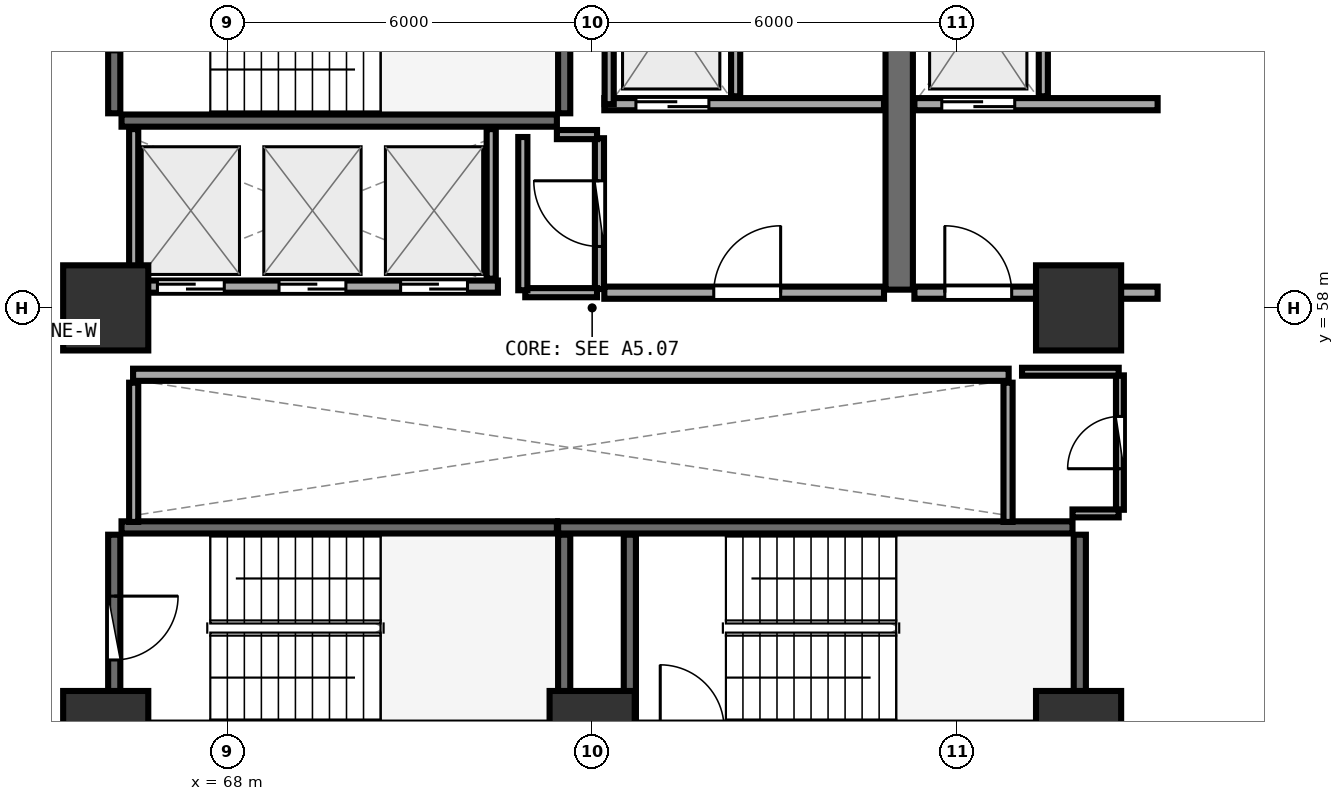
"""IFC4 building model, lengths in metres.
Left out: names, types, materials, properties, quantities, classifications, styles, units other than length and angle.
Written with IfcOpenShell. Run it as: python <this file> out.ifc"""

import sys

from ifc_helpers import new_model, si_unit, direction, frame, frame_2d, origin, origin_2d, place, context, subcontext, project, spatial, rectangle, extrude, element, fill, save


model = new_model("IFC4")
c1 = context("Model", 3, precision=1e-05, world=origin(), true_north=direction((0.0, 1.0)))
c2 = subcontext(c1, "Body", "Model", "MODEL_VIEW")
j1 = project(units=[si_unit("LENGTHUNIT", "METRE"), si_unit("PLANEANGLEUNIT", "RADIAN")], contexts=[c1])
p1 = place(None, origin())
s1 = spatial("IfcSite", under=j1, at=p1, CompositionType="ELEMENT")
p2 = place(p1, origin())
s2 = spatial("IfcBuilding", under=s1, at=p2, CompositionType="ELEMENT")
p3 = place(p2, frame((0.0, 0.0, 63.75)))
s3 = spatial("IfcBuildingStorey", under=s2, at=p3, CompositionType="ELEMENT", Elevation=63.75)
for number, where, z_axis, x_axis in (
    (1, (66.0, 51.0, 0.0), (0.0, 0.0, 1.0), (1.0, 0.0, 0.0)),
    (2, (74.0, 51.0, 0.0), (0.0, 0.0, 1.0), (1.0, 0.0, 0.0)),
    (3, (82.0, 51.0, 0.0), (0.0, 0.0, 1.0), (1.0, 0.0, 0.0)),
    (4, (82.0, 58.0, 0.0), (0.0, 0.0, 1.0), (1.0, 0.0, 0.0)),
    (5, (66.0, 58.0, 0.0), (0.0, 0.0, 1.0), (1.0, 0.0, 0.0)),
):
    element("IfcColumn", number, at=place(p3, frame(where, z_axis=z_axis, x_axis=x_axis)), inside=s3, PredefinedType="PILASTER", context=c2, shape_type="SweptSolid", body=[
        extrude(rectangle(XDim=1.4, YDim=1.4, at=origin_2d()), origin(), (0.0, 0.0, 1.0), 3.75),
    ])
p4 = place(p3, frame((66.26, 61.08, 0.0), z_axis=(0.0, 0.0, 1.0), x_axis=(1.0, 0.0, 0.0)))
e6 = element("IfcWall", 6, at=p4, inside=s3, PredefinedType="SHEAR", context=c2, shape_type="SweptSolid", body=[
    extrude(rectangle(XDim=7.16, YDim=0.2, at=frame_2d((3.58, 0.0))), origin(), (0.0, 0.0, 1.0), 3.49),
])
p5 = place(p3, frame((73.54, 61.2, 0.0), z_axis=(0.0, 0.0, 1.0), x_axis=(0.0, 1.0, 0.0)))
e7 = element("IfcWall", 7, at=p5, inside=s3, PredefinedType="SHEAR", context=c2, shape_type="SweptSolid", body=[
    extrude(rectangle(XDim=3.07, YDim=0.2, at=frame_2d((1.535, 0.0))), origin(), (0.0, 0.0, 1.0), 3.49),
])
p6 = place(p3, frame((66.14, 64.27, 0.0), z_axis=(0.0, 0.0, 1.0), x_axis=(0.0, -1.0, 0.0)))
e8 = element("IfcWall", 8, at=p6, inside=s3, PredefinedType="SHEAR", context=c2, shape_type="SweptSolid", body=[
    extrude(rectangle(XDim=3.07, YDim=0.2, at=frame_2d((1.535, 0.0))), origin(), (0.0, 0.0, 1.0), 3.49),
])
p7 = place(p6, frame((1.01, 0.0, 0.0)))
e9 = element("IfcOpeningElement", 9, at=p7, cuts=e8, PredefinedType="OPENING", context=c2, shape_type="SweptSolid", body=[
    extrude(rectangle(XDim=1.05, YDim=2.1, at=frame_2d((0.525, 1.05))), frame((0.0, 0.11, 0.0), z_axis=(0.0, -1.0, 0.0), x_axis=(1.0, 0.0, 0.0)), (0.0, 0.0, 1.0), 0.22),
])
p8 = place(p3, frame((82.02, 51.2, 0.0), z_axis=(0.0, 0.0, 1.0), x_axis=(0.0, 1.0, 0.0)))
e10 = element("IfcWall", 10, at=p8, inside=s3, PredefinedType="SHEAR", context=c2, shape_type="SweptSolid", body=[
    extrude(rectangle(XDim=3.07, YDim=0.2, at=frame_2d((1.535, 0.0))), origin(), (0.0, 0.0, 1.0), 3.49),
])
p9 = place(p3, frame((81.9, 54.39, 0.0), z_axis=(0.0, 0.0, 1.0), x_axis=(-1.0, 0.0, 0.0)))
e11 = element("IfcWall", 11, at=p9, inside=s3, PredefinedType="SHEAR", context=c2, shape_type="SweptSolid", body=[
    extrude(rectangle(XDim=8.46, YDim=0.2, at=frame_2d((4.23, 0.0))), origin(), (0.0, 0.0, 1.0), 3.49),
])
for number, where, z_axis, x_axis in (
    (12, (74.62, 54.27, 0.0), (0.0, 0.0, 1.0), (0.0, -1.0, 0.0)),
    (13, (73.54, 51.2, 0.0), (0.0, 0.0, 1.0), (0.0, 1.0, 0.0)),
):
    element("IfcWall", number, at=place(p3, frame(where, z_axis=z_axis, x_axis=x_axis)), inside=s3, PredefinedType="SHEAR", context=c2, shape_type="SweptSolid", body=[
        extrude(rectangle(XDim=3.07, YDim=0.2, at=frame_2d((1.535, 0.0))), origin(), (0.0, 0.0, 1.0), 3.49),
    ])
p10 = place(p3, frame((73.42, 54.39, 0.0), z_axis=(0.0, 0.0, 1.0), x_axis=(-1.0, 0.0, 0.0)))
e14 = element("IfcWall", 14, at=p10, inside=s3, PredefinedType="SHEAR", context=c2, shape_type="SweptSolid", body=[
    extrude(rectangle(XDim=7.16, YDim=0.2, at=frame_2d((3.58, 0.0))), origin(), (0.0, 0.0, 1.0), 3.49),
])
p11 = place(p3, frame((66.14, 54.27, 0.0), z_axis=(0.0, 0.0, 1.0), x_axis=(0.0, -1.0, 0.0)))
e15 = element("IfcWall", 15, at=p11, inside=s3, PredefinedType="SHEAR", context=c2, shape_type="SweptSolid", body=[
    extrude(rectangle(XDim=3.07, YDim=0.2, at=frame_2d((1.535, 0.0))), origin(), (0.0, 0.0, 1.0), 3.49),
])
p12 = place(p11, frame((1.01, 0.0, 0.0)))
e16 = element("IfcOpeningElement", 16, at=p12, cuts=e15, PredefinedType="OPENING", context=c2, shape_type="SweptSolid", body=[
    extrude(rectangle(XDim=1.05, YDim=2.1, at=frame_2d((0.525, 1.05))), frame((0.0, 0.11, 0.0), z_axis=(0.0, -1.0, 0.0), x_axis=(1.0, 0.0, 0.0)), (0.0, 0.0, 1.0), 0.22),
])
p13 = place(p3, frame((79.05, 58.3, 0.0), z_axis=(0.0, 0.0, 1.0), x_axis=(0.0, 1.0, 0.0)))
e17 = element("IfcWall", 17, at=p13, inside=s3, PredefinedType="SHEAR", context=c2, shape_type="SweptSolid", body=[
    extrude(rectangle(XDim=6.3, YDim=0.45, at=frame_2d((3.15, 0.0))), origin(), (0.0, 0.0, 1.0), 3.49),
])
p14 = place(p3, frame((74.2, 61.35, 0.0), z_axis=(0.0, 0.0, 1.0), x_axis=(1.0, 0.0, 0.0)))
e18 = element("IfcWall", 18, at=p14, inside=s3, PredefinedType="SOLIDWALL", context=c2, shape_type="SweptSolid", body=[
    extrude(rectangle(XDim=4.6, YDim=0.2, at=frame_2d((2.3, 0.0))), origin(), (0.0, 0.0, 1.0), 3.48),
])
p15 = place(p14, frame((0.52, 0.0, 0.0)))
e19 = element("IfcOpeningElement", 19, at=p15, cuts=e18, PredefinedType="OPENING", context=c2, shape_type="SweptSolid", body=[
    extrude(rectangle(XDim=1.2, YDim=2.15, at=frame_2d((0.6, 1.075))), frame((0.0, 0.11, 0.0), z_axis=(0.0, -1.0, 0.0), x_axis=(1.0, 0.0, 0.0)), (0.0, 0.0, 1.0), 0.22),
])
p16 = place(p3, frame((74.28, 61.35, 0.0), z_axis=(0.0, 0.0, 1.0), x_axis=(0.0, 1.0, 0.0)))
e20 = element("IfcWall", 20, at=p16, inside=s3, PredefinedType="PARTITIONING", context=c2, shape_type="SweptSolid", body=[
    extrude(rectangle(XDim=2.97, YDim=0.15, at=frame_2d((1.485, 0.0))), origin(), (0.0, 0.0, 1.0), 3.48),
])
p17 = place(p3, frame((76.36, 61.48, 0.0), z_axis=(0.0, 0.0, 1.0), x_axis=(0.0, 1.0, 0.0)))
e21 = element("IfcWall", 21, at=p17, inside=s3, PredefinedType="PARTITIONING", context=c2, shape_type="SweptSolid", body=[
    extrude(rectangle(XDim=2.84, YDim=0.15, at=frame_2d((1.42, 0.0))), origin(), (0.0, 0.0, 1.0), 3.48),
])
p18 = place(p3, frame((79.3, 61.35, 0.0), z_axis=(0.0, 0.0, 1.0), x_axis=(1.0, 0.0, 0.0)))
e22 = element("IfcWall", 22, at=p18, inside=s3, PredefinedType="SOLIDWALL", context=c2, shape_type="SweptSolid", body=[
    extrude(rectangle(XDim=4.0, YDim=0.2, at=frame_2d((2.0, 0.0))), origin(), (0.0, 0.0, 1.0), 2.775),
])
p19 = place(p18, frame((0.45, 0.0, 0.0)))
e23 = element("IfcOpeningElement", 23, at=p19, cuts=e22, PredefinedType="OPENING", context=c2, shape_type="SweptSolid", body=[
    extrude(rectangle(XDim=1.2, YDim=2.15, at=frame_2d((0.6, 1.075))), frame((0.0, 0.11, 0.0), z_axis=(0.0, -1.0, 0.0), x_axis=(1.0, 0.0, 0.0)), (0.0, 0.0, 1.0), 0.22),
])
p20 = place(p3, frame((81.42, 61.48, 0.0), z_axis=(0.0, 0.0, 1.0), x_axis=(0.0, 1.0, 0.0)))
e24 = element("IfcWall", 24, at=p20, inside=s3, PredefinedType="PARTITIONING", context=c2, shape_type="SweptSolid", body=[
    extrude(rectangle(XDim=2.84, YDim=0.15, at=frame_2d((1.42, 0.0))), origin(), (0.0, 0.0, 1.0), 3.48),
])
p21 = place(p3, frame((74.2, 58.25, 0.0), z_axis=(0.0, 0.0, 1.0), x_axis=(1.0, 0.0, 0.0)))
e25 = element("IfcWall", 25, at=p21, inside=s3, PredefinedType="SOLIDWALL", context=c2, shape_type="SweptSolid", body=[
    extrude(rectangle(XDim=4.6, YDim=0.2, at=frame_2d((2.3, 0.0))), origin(), (0.0, 0.0, 1.0), 3.48),
])
p22 = place(p21, frame((1.8, 0.0, 0.0)))
e26 = element("IfcOpeningElement", 26, at=p22, cuts=e25, PredefinedType="OPENING", context=c2, shape_type="SweptSolid", body=[
    extrude(rectangle(XDim=1.1, YDim=2.1, at=frame_2d((0.55, 1.05))), frame((0.0, 0.11, 0.0), z_axis=(0.0, -1.0, 0.0), x_axis=(1.0, 0.0, 0.0)), (0.0, 0.0, 1.0), 0.22),
])
p23 = place(p3, frame((79.3, 58.25, 0.0), z_axis=(0.0, 0.0, 1.0), x_axis=(1.0, 0.0, 0.0)))
e27 = element("IfcWall", 27, at=p23, inside=s3, PredefinedType="SOLIDWALL", context=c2, shape_type="SweptSolid", body=[
    extrude(rectangle(XDim=4.0, YDim=0.2, at=frame_2d((2.0, 0.0))), origin(), (0.0, 0.0, 1.0), 2.775),
])
p24 = place(p23, frame((0.5, 0.0, 0.0)))
e28 = element("IfcOpeningElement", 28, at=p24, cuts=e27, PredefinedType="OPENING", context=c2, shape_type="SweptSolid", body=[
    extrude(rectangle(XDim=1.1, YDim=2.1, at=frame_2d((0.55, 1.05))), frame((0.0, 0.11, 0.0), z_axis=(0.0, -1.0, 0.0), x_axis=(1.0, 0.0, 0.0)), (0.0, 0.0, 1.0), 0.22),
])
p25 = place(p3, frame((66.45, 58.35, 0.0), z_axis=(0.0, 0.0, 1.0), x_axis=(1.0, 0.0, 0.0)))
e29 = element("IfcWall", 29, at=p25, inside=s3, PredefinedType="SOLIDWALL", context=c2, shape_type="SweptSolid", body=[
    extrude(rectangle(XDim=6.0, YDim=0.2, at=frame_2d((3.0, 0.0))), origin(), (0.0, 0.0, 1.0), 3.48),
])
p26 = place(p25, frame((0.4, 0.0, 0.0)))
e30 = element("IfcOpeningElement", 30, at=p26, cuts=e29, PredefinedType="OPENING", context=c2, shape_type="SweptSolid", body=[
    extrude(rectangle(XDim=1.1, YDim=2.1, at=frame_2d((0.55, 1.05))), frame((0.0, 0.11, 0.0), z_axis=(0.0, -1.0, 0.0), x_axis=(1.0, 0.0, 0.0)), (0.0, 0.0, 1.0), 0.22),
])
p27 = place(p25, frame((2.4, 0.0, 0.0)))
e31 = element("IfcOpeningElement", 31, at=p27, cuts=e29, PredefinedType="OPENING", context=c2, shape_type="SweptSolid", body=[
    extrude(rectangle(XDim=1.1, YDim=2.1, at=frame_2d((0.55, 1.05))), frame((0.0, 0.11, 0.0), z_axis=(0.0, -1.0, 0.0), x_axis=(1.0, 0.0, 0.0)), (0.0, 0.0, 1.0), 0.22),
])
p28 = place(p25, frame((4.4, 0.0, 0.0)))
e32 = element("IfcOpeningElement", 32, at=p28, cuts=e29, PredefinedType="OPENING", context=c2, shape_type="SweptSolid", body=[
    extrude(rectangle(XDim=1.1, YDim=2.1, at=frame_2d((0.55, 1.05))), frame((0.0, 0.11, 0.0), z_axis=(0.0, -1.0, 0.0), x_axis=(1.0, 0.0, 0.0)), (0.0, 0.0, 1.0), 0.22),
])
for number, where, z_axis, x_axis in (
    (33, (66.46, 58.48, 0.0), (0.0, 0.0, 1.0), (0.0, 1.0, 0.0)),
    (34, (72.34, 58.48, 0.0), (0.0, 0.0, 1.0), (0.0, 1.0, 0.0)),
):
    element("IfcWall", number, at=place(p3, frame(where, z_axis=z_axis, x_axis=x_axis)), inside=s3, PredefinedType="PARTITIONING", context=c2, shape_type="SweptSolid", body=[
        extrude(rectangle(XDim=2.46, YDim=0.15, at=frame_2d((1.23, 0.0))), origin(), (0.0, 0.0, 1.0), 3.48),
    ])
p29 = place(p3, frame((66.45, 56.9, 0.0), z_axis=(0.0, 0.0, 1.0), x_axis=(1.0, 0.0, 0.0)))
e35 = element("IfcWall", 35, at=p29, inside=s3, PredefinedType="SOLIDWALL", context=c2, shape_type="SweptSolid", body=[
    extrude(rectangle(XDim=14.4, YDim=0.2, at=frame_2d((7.2, 0.0))), origin(), (0.0, 0.0, 1.0), 3.48),
])
for number, where, z_axis, x_axis in (
    (36, (66.46, 54.48, 0.0), (0.0, 0.0, 1.0), (0.0, 1.0, 0.0)),
    (37, (80.84, 54.48, 0.0), (0.0, 0.0, 1.0), (0.0, 1.0, 0.0)),
):
    element("IfcWall", number, at=place(p3, frame(where, z_axis=z_axis, x_axis=x_axis)), inside=s3, PredefinedType="PARTITIONING", context=c2, shape_type="SweptSolid", body=[
        extrude(rectangle(XDim=2.29, YDim=0.15, at=frame_2d((1.145, 0.0))), origin(), (0.0, 0.0, 1.0), 3.48),
    ])
p30 = place(p3, frame((74.12, 58.31, 0.0), z_axis=(0.0, 0.0, 1.0), x_axis=(0.0, 1.0, 0.0)))
e38 = element("IfcWall", 38, at=p30, inside=s3, PredefinedType="PARTITIONING", context=c2, shape_type="SweptSolid", body=[
    extrude(rectangle(XDim=2.48, YDim=0.15, at=frame_2d((1.24, 0.0))), origin(), (0.0, 0.0, 1.0), 3.48),
])
p31 = place(p30, frame((0.7, 0.0, 0.0)))
e39 = element("IfcOpeningElement", 39, at=p31, cuts=e38, PredefinedType="OPENING", context=c2, shape_type="SweptSolid", body=[
    extrude(rectangle(XDim=1.08, YDim=2.1, at=frame_2d((0.54, 1.05))), frame((0.0, 0.085, 0.0), z_axis=(0.0, -1.0, 0.0), x_axis=(1.0, 0.0, 0.0)), (0.0, 0.0, 1.0), 0.17),
])
p32 = place(p3, frame((82.68, 54.68, 0.0), z_axis=(0.0, 0.0, 1.0), x_axis=(0.0, 1.0, 0.0)))
e40 = element("IfcWall", 40, at=p32, inside=s3, PredefinedType="PLUMBINGWALL", context=c2, shape_type="SweptSolid", body=[
    extrude(rectangle(XDim=2.21, YDim=0.13, at=frame_2d((1.105, 0.0))), origin(), (0.0, 0.0, 1.0), 3.48),
])
p33 = place(p32, frame((0.675, 0.0, 0.0)))
e41 = element("IfcOpeningElement", 41, at=p33, cuts=e40, PredefinedType="OPENING", context=c2, shape_type="SweptSolid", body=[
    extrude(rectangle(XDim=0.86, YDim=2.05, at=frame_2d((0.43, 1.025))), frame((0.0, 0.075, 0.0), z_axis=(0.0, -1.0, 0.0), x_axis=(1.0, 0.0, 0.0)), (0.0, 0.0, 1.0), 0.15),
])
p34 = place(p3, frame((72.9, 58.25, 0.0), z_axis=(0.0, 0.0, 1.0), x_axis=(1.0, 0.0, 0.0)))
e42 = element("IfcWall", 42, at=p34, inside=s3, PredefinedType="PARTITIONING", context=c2, shape_type="SweptSolid", body=[
    extrude(rectangle(XDim=1.18, YDim=0.15, at=frame_2d((0.59, 0.0))), origin(), (0.0, 0.0, 1.0), 3.48),
])
p35 = place(p3, frame((74.08, 60.85, 0.0), z_axis=(0.0, 0.0, 1.0), x_axis=(-1.0, 0.0, 0.0)))
e43 = element("IfcWall", 43, at=p35, inside=s3, PredefinedType="PARTITIONING", context=c2, shape_type="SweptSolid", body=[
    extrude(rectangle(XDim=0.66, YDim=0.15, at=frame_2d((0.33, 0.0))), origin(), (0.0, 0.0, 1.0), 3.48),
])
p36 = place(p3, frame((72.86, 60.81, 0.0), z_axis=(0.0, 0.0, 1.0), x_axis=(0.0, -1.0, 0.0)))
e44 = element("IfcWall", 44, at=p36, inside=s3, PredefinedType="PARTITIONING", context=c2, shape_type="SweptSolid", body=[
    extrude(rectangle(XDim=2.52, YDim=0.15, at=frame_2d((1.26, 0.0))), origin(), (0.0, 0.0, 1.0), 3.48),
])
p37 = place(p3, frame((81.9, 54.62, 0.0), z_axis=(0.0, 0.0, 1.0), x_axis=(1.0, 0.0, 0.0)))
e45 = element("IfcWall", 45, at=p37, inside=s3, PredefinedType="PLUMBINGWALL", context=c2, shape_type="SweptSolid", body=[
    extrude(rectangle(XDim=0.76, YDim=0.13, at=frame_2d((0.38, 0.0))), origin(), (0.0, 0.0, 1.0), 2.775),
])
p38 = place(p3, frame((82.66, 56.95, 0.0), z_axis=(0.0, 0.0, 1.0), x_axis=(-1.0, 0.0, 0.0)))
e46 = element("IfcWall", 46, at=p38, inside=s3, PredefinedType="PLUMBINGWALL", context=c2, shape_type="SweptSolid", body=[
    extrude(rectangle(XDim=1.59, YDim=0.13, at=frame_2d((0.795, 0.0))), origin(), (0.0, 0.0, 1.0), 2.775),
])
p39 = place(p12, origin())
e47 = element("IfcDoor", 47, at=p39, inside=s3, OperationType="SINGLE_SWING_LEFT", PredefinedType="DOOR", context=c2, shape_type="SweptSolid", body=[
    extrude(rectangle(XDim=1.05, YDim=2.1, at=frame_2d((0.525, 1.05))), frame((0.0, 0.025, 0.0), z_axis=(0.0, -1.0, 0.0), x_axis=(1.0, 0.0, 0.0)), (0.0, 0.0, 1.0), 0.05),
])
fill(e16, e47)
p40 = place(p15, origin())
e48 = element("IfcDoor", 48, at=p40, inside=s3, OperationType="DOUBLE_DOOR_SLIDING", PredefinedType="DOOR", context=c2, shape_type="SweptSolid", body=[
    extrude(rectangle(XDim=1.2, YDim=2.15, at=frame_2d((0.6, 1.075))), frame((0.0, 0.025, 0.0), z_axis=(0.0, -1.0, 0.0), x_axis=(1.0, 0.0, 0.0)), (0.0, 0.0, 1.0), 0.05),
])
fill(e19, e48)
p41 = place(p19, origin())
e49 = element("IfcDoor", 49, at=p41, inside=s3, OperationType="DOUBLE_DOOR_SLIDING", PredefinedType="DOOR", context=c2, shape_type="SweptSolid", body=[
    extrude(rectangle(XDim=1.2, YDim=2.15, at=frame_2d((0.6, 1.075))), frame((0.0, 0.025, 0.0), z_axis=(0.0, -1.0, 0.0), x_axis=(1.0, 0.0, 0.0)), (0.0, 0.0, 1.0), 0.05),
])
fill(e23, e49)
p42 = place(p22, frame((1.1, 0.0, 0.0), z_axis=(0.0, 0.0, 1.0), x_axis=(-1.0, 0.0, 0.0)))
e50 = element("IfcDoor", 50, at=p42, inside=s3, OperationType="SINGLE_SWING_LEFT", PredefinedType="DOOR", context=c2, shape_type="SweptSolid", body=[
    extrude(rectangle(XDim=1.1, YDim=2.1, at=frame_2d((0.55, 1.05))), frame((0.0, 0.025, 0.0), z_axis=(0.0, -1.0, 0.0), x_axis=(1.0, 0.0, 0.0)), (0.0, 0.0, 1.0), 0.05),
])
fill(e26, e50)
p43 = place(p24, frame((1.1, 0.0, 0.0), z_axis=(0.0, 0.0, 1.0), x_axis=(-1.0, 0.0, 0.0)))
e51 = element("IfcDoor", 51, at=p43, inside=s3, OperationType="SINGLE_SWING_RIGHT", PredefinedType="DOOR", context=c2, shape_type="SweptSolid", body=[
    extrude(rectangle(XDim=1.1, YDim=2.1, at=frame_2d((0.55, 1.05))), frame((0.0, 0.025, 0.0), z_axis=(0.0, -1.0, 0.0), x_axis=(1.0, 0.0, 0.0)), (0.0, 0.0, 1.0), 0.05),
])
fill(e28, e51)
p44 = place(p26, origin())
e52 = element("IfcDoor", 52, at=p44, inside=s3, OperationType="DOUBLE_DOOR_SLIDING", PredefinedType="DOOR", context=c2, shape_type="SweptSolid", body=[
    extrude(rectangle(XDim=1.1, YDim=2.1, at=frame_2d((0.55, 1.05))), frame((0.0, 0.025, 0.0), z_axis=(0.0, -1.0, 0.0), x_axis=(1.0, 0.0, 0.0)), (0.0, 0.0, 1.0), 0.05),
])
fill(e30, e52)
p45 = place(p27, origin())
e53 = element("IfcDoor", 53, at=p45, inside=s3, OperationType="DOUBLE_DOOR_SLIDING", PredefinedType="DOOR", context=c2, shape_type="SweptSolid", body=[
    extrude(rectangle(XDim=1.1, YDim=2.1, at=frame_2d((0.55, 1.05))), frame((0.0, 0.025, 0.0), z_axis=(0.0, -1.0, 0.0), x_axis=(1.0, 0.0, 0.0)), (0.0, 0.0, 1.0), 0.05),
])
fill(e31, e53)
p46 = place(p28, origin())
e54 = element("IfcDoor", 54, at=p46, inside=s3, OperationType="DOUBLE_DOOR_SLIDING", PredefinedType="DOOR", context=c2, shape_type="SweptSolid", body=[
    extrude(rectangle(XDim=1.1, YDim=2.1, at=frame_2d((0.55, 1.05))), frame((0.0, 0.025, 0.0), z_axis=(0.0, -1.0, 0.0), x_axis=(1.0, 0.0, 0.0)), (0.0, 0.0, 1.0), 0.05),
])
fill(e32, e54)
p47 = place(p31, origin())
e55 = element("IfcDoor", 55, at=p47, inside=s3, OperationType="SINGLE_SWING_RIGHT", PredefinedType="DOOR", context=c2, shape_type="SweptSolid", body=[
    extrude(rectangle(XDim=1.08, YDim=2.1, at=frame_2d((0.54, 1.05))), frame((0.0, 0.025, 0.0), z_axis=(0.0, -1.0, 0.0), x_axis=(1.0, 0.0, 0.0)), (0.0, 0.0, 1.0), 0.05),
])
fill(e39, e55)
p48 = place(p33, origin())
e56 = element("IfcDoor", 56, at=p48, inside=s3, OperationType="SINGLE_SWING_LEFT", PredefinedType="DOOR", context=c2, shape_type="SweptSolid", body=[
    extrude(rectangle(XDim=0.86, YDim=2.05, at=frame_2d((0.43, 1.025))), frame((0.0, 0.025, 0.0), z_axis=(0.0, -1.0, 0.0), x_axis=(1.0, 0.0, 0.0)), (0.0, 0.0, 1.0), 0.05),
])
fill(e41, e56)
save(model, sys.argv[1])
